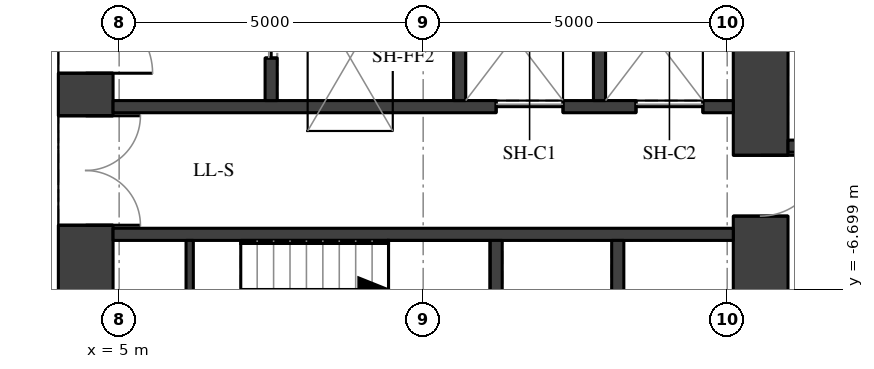
"""IFC4 building model, lengths in metres.
Left out: names, types, materials, properties, quantities, classifications, styles, units other than length and angle.
Written with IfcOpenShell. Run it as: python <this file> out.ifc"""

import sys

from ifc_helpers import new_model, si_unit, direction, frame, frame_2d, origin, place, context, subcontext, project, spatial, rectangle, extrude, element, fill, save


model = new_model("IFC4")
c1 = context("Model", 3, precision=1e-05, world=origin(), true_north=direction((0.0, 1.0)))
c2 = subcontext(c1, "Body", "Model", "MODEL_VIEW")
j1 = project(units=[si_unit("LENGTHUNIT", "METRE"), si_unit("PLANEANGLEUNIT", "RADIAN")], contexts=[c1])
p1 = place(None, origin())
s1 = spatial("IfcSite", under=j1, at=p1, CompositionType="ELEMENT")
p2 = place(p1, origin())
s2 = spatial("IfcBuilding", under=s1, at=p2, CompositionType="ELEMENT")
p3 = place(p2, frame((0.0, 0.0, 25.0)))
s3 = spatial("IfcBuildingStorey", under=s2, at=p3, CompositionType="ELEMENT", Elevation=25.0)
p4 = place(p3, frame((4.45, -11.1, 0.0), z_axis=(0.0, 0.0, 1.0), x_axis=(0.0, 1.0, 0.0)))
e1 = element("IfcWall", 1, at=p4, inside=s3, PredefinedType="SHEAR", context=c2, shape_type="SweptSolid", body=[
    extrude(rectangle(XDim=22.2, YDim=0.9, at=frame_2d((11.1, 0.0))), origin(), (0.0, 0.0, 1.0), 3.02),
])
p5 = place(p4, frame((2.35, 0.0, 0.0)))
e2 = element("IfcOpeningElement", 2, at=p5, cuts=e1, PredefinedType="OPENING", context=c2, shape_type="SweptSolid", body=[
    extrude(rectangle(XDim=1.5, YDim=2.1, at=frame_2d((0.75, 1.05))), frame((0.0, 0.46, 0.0), z_axis=(0.0, -1.0, 0.0), x_axis=(1.0, 0.0, 0.0)), (0.0, 0.0, 1.0), 0.92),
])
p6 = place(p4, frame((5.45, 0.0, 0.0)))
e3 = element("IfcOpeningElement", 3, at=p6, cuts=e1, PredefinedType="OPENING", context=c2, shape_type="SweptSolid", body=[
    extrude(rectangle(XDim=1.8, YDim=2.1, at=frame_2d((0.9, 1.05))), frame((0.0, 0.46, 0.0), z_axis=(0.0, -1.0, 0.0), x_axis=(1.0, 0.0, 0.0)), (0.0, 0.0, 1.0), 0.92),
])
p7 = place(p4, frame((7.95, 0.0, 0.0)))
e4 = element("IfcOpeningElement", 4, at=p7, cuts=e1, PredefinedType="OPENING", context=c2, shape_type="SweptSolid", body=[
    extrude(rectangle(XDim=1.1, YDim=2.1, at=frame_2d((0.55, 1.05))), frame((0.0, 0.46, 0.0), z_axis=(0.0, -1.0, 0.0), x_axis=(1.0, 0.0, 0.0)), (0.0, 0.0, 1.0), 0.92),
])
p8 = place(p4, frame((10.6, 0.0, 0.0)))
e5 = element("IfcOpeningElement", 5, at=p8, cuts=e1, PredefinedType="OPENING", context=c2, shape_type="SweptSolid", body=[
    extrude(rectangle(XDim=1.0, YDim=2.1, at=frame_2d((0.5, 1.05))), frame((0.0, 0.46, 0.0), z_axis=(0.0, -1.0, 0.0), x_axis=(1.0, 0.0, 0.0)), (0.0, 0.0, 1.0), 0.92),
])
p9 = place(p4, frame((13.15, 0.0, 0.0)))
e6 = element("IfcOpeningElement", 6, at=p9, cuts=e1, PredefinedType="OPENING", context=c2, shape_type="SweptSolid", body=[
    extrude(rectangle(XDim=1.1, YDim=2.1, at=frame_2d((0.55, 1.05))), frame((0.0, 0.46, 0.0), z_axis=(0.0, -1.0, 0.0), x_axis=(1.0, 0.0, 0.0)), (0.0, 0.0, 1.0), 0.92),
])
p10 = place(p4, frame((14.95, 0.0, 0.0)))
e7 = element("IfcOpeningElement", 7, at=p10, cuts=e1, PredefinedType="OPENING", context=c2, shape_type="SweptSolid", body=[
    extrude(rectangle(XDim=1.8, YDim=2.1, at=frame_2d((0.9, 1.05))), frame((0.0, 0.46, 0.0), z_axis=(0.0, -1.0, 0.0), x_axis=(1.0, 0.0, 0.0)), (0.0, 0.0, 1.0), 0.92),
])
p11 = place(p4, frame((18.35, 0.0, 0.0)))
e8 = element("IfcOpeningElement", 8, at=p11, cuts=e1, PredefinedType="OPENING", context=c2, shape_type="SweptSolid", body=[
    extrude(rectangle(XDim=1.5, YDim=2.1, at=frame_2d((0.75, 1.05))), frame((0.0, 0.46, 0.0), z_axis=(0.0, -1.0, 0.0), x_axis=(1.0, 0.0, 0.0)), (0.0, 0.0, 1.0), 0.92),
])
p12 = place(p3, frame((15.55, -11.1, 0.0), z_axis=(0.0, 0.0, 1.0), x_axis=(0.0, 1.0, 0.0)))
e9 = element("IfcWall", 9, at=p12, inside=s3, PredefinedType="SHEAR", context=c2, shape_type="SweptSolid", body=[
    extrude(rectangle(XDim=22.2, YDim=0.9, at=frame_2d((11.1, 0.0))), origin(), (0.0, 0.0, 1.0), 3.02),
])
p13 = place(p12, frame((15.6, 0.0, 0.0)))
e10 = element("IfcOpeningElement", 10, at=p13, cuts=e9, PredefinedType="OPENING", context=c2, shape_type="SweptSolid", body=[
    extrude(rectangle(XDim=1.0, YDim=2.1, at=frame_2d((0.5, 1.05))), frame((0.0, 0.46, 0.0), z_axis=(0.0, -1.0, 0.0), x_axis=(1.0, 0.0, 0.0)), (0.0, 0.0, 1.0), 0.92),
])
p14 = place(p12, frame((5.6, 0.0, 0.0)))
e11 = element("IfcOpeningElement", 11, at=p14, cuts=e9, PredefinedType="OPENING", context=c2, shape_type="SweptSolid", body=[
    extrude(rectangle(XDim=1.0, YDim=2.1, at=frame_2d((0.5, 1.05))), frame((0.0, 0.46, 0.0), z_axis=(0.0, -1.0, 0.0), x_axis=(1.0, 0.0, 0.0)), (0.0, 0.0, 1.0), 0.92),
])
p15 = place(p3, frame((4.9, -3.7, 0.0), z_axis=(0.0, 0.0, 1.0), x_axis=(1.0, 0.0, 0.0)))
e12 = element("IfcWall", 12, at=p15, inside=s3, PredefinedType="SHEAR", context=c2, shape_type="SweptSolid", body=[
    extrude(rectangle(XDim=10.2, YDim=0.2, at=frame_2d((5.1, 0.0))), origin(), (0.0, 0.0, 1.0), 3.02),
])
p16 = place(p15, frame((6.3, 0.0, 0.0)))
e13 = element("IfcOpeningElement", 13, at=p16, cuts=e12, PredefinedType="OPENING", context=c2, shape_type="SweptSolid", body=[
    extrude(rectangle(XDim=1.1, YDim=2.1, at=frame_2d((0.55, 1.05))), frame((0.0, 0.11, 0.0), z_axis=(0.0, -1.0, 0.0), x_axis=(1.0, 0.0, 0.0)), (0.0, 0.0, 1.0), 0.22),
])
p17 = place(p15, frame((8.6, 0.0, 0.0)))
e14 = element("IfcOpeningElement", 14, at=p17, cuts=e12, PredefinedType="OPENING", context=c2, shape_type="SweptSolid", body=[
    extrude(rectangle(XDim=1.1, YDim=2.1, at=frame_2d((0.55, 1.05))), frame((0.0, 0.11, 0.0), z_axis=(0.0, -1.0, 0.0), x_axis=(1.0, 0.0, 0.0)), (0.0, 0.0, 1.0), 0.22),
])
p18 = place(p3, frame((4.9, -5.8, 0.0), z_axis=(0.0, 0.0, 1.0), x_axis=(1.0, 0.0, 0.0)))
e15 = element("IfcWall", 15, at=p18, inside=s3, PredefinedType="SHEAR", context=c2, shape_type="SweptSolid", body=[
    extrude(rectangle(XDim=10.2, YDim=0.2, at=frame_2d((5.1, 0.0))), origin(), (0.0, 0.0, 1.0), 3.02),
])
for number, where, z_axis, x_axis in (
    (16, (11.2, -9.1, 0.0), (0.0, 0.0, 1.0), (0.0, 1.0, 0.0)),
    (17, (13.2, -9.1, 0.0), (0.0, 0.0, 1.0), (0.0, 1.0, 0.0)),
):
    element("IfcWall", number, at=place(p3, frame(where, z_axis=z_axis, x_axis=x_axis)), inside=s3, PredefinedType="SHEAR", context=c2, shape_type="SweptSolid", body=[
        extrude(rectangle(XDim=3.2, YDim=0.2, at=frame_2d((1.6, 0.0))), origin(), (0.0, 0.0, 1.0), 3.02),
    ])
p19 = place(p3, frame((7.5, -3.6, 0.0), z_axis=(0.0, 0.0, 1.0), x_axis=(0.0, 1.0, 0.0)))
e18 = element("IfcWall", 18, at=p19, inside=s3, PredefinedType="SHEAR", context=c2, shape_type="SweptSolid", body=[
    extrude(rectangle(XDim=2.5, YDim=0.2, at=frame_2d((1.25, 0.0))), origin(), (0.0, 0.0, 1.0), 3.02),
])
p20 = place(p19, frame((0.7, 0.0, 0.0)))
e19 = element("IfcOpeningElement", 19, at=p20, cuts=e18, PredefinedType="OPENING", context=c2, shape_type="SweptSolid", body=[
    extrude(rectangle(XDim=1.1, YDim=2.1, at=frame_2d((0.55, 1.05))), frame((0.0, 0.11, 0.0), z_axis=(0.0, -1.0, 0.0), x_axis=(1.0, 0.0, 0.0)), (0.0, 0.0, 1.0), 0.22),
])
for number, where, z_axis, x_axis in (
    (20, (10.6, -3.6, 0.0), (0.0, 0.0, 1.0), (0.0, 1.0, 0.0)),
    (21, (12.9, -3.6, 0.0), (0.0, 0.0, 1.0), (0.0, 1.0, 0.0)),
):
    element("IfcWall", number, at=place(p3, frame(where, z_axis=z_axis, x_axis=x_axis)), inside=s3, PredefinedType="SHEAR", context=c2, shape_type="SweptSolid", body=[
        extrude(rectangle(XDim=2.5, YDim=0.2, at=frame_2d((1.25, 0.0))), origin(), (0.0, 0.0, 1.0), 3.02),
    ])
p21 = place(p3, frame((6.16, -9.1, 0.0), z_axis=(0.0, 0.0, 1.0), x_axis=(0.0, 1.0, 0.0)))
e22 = element("IfcWall", 22, at=p21, inside=s3, PredefinedType="SHEAR", context=c2, shape_type="SweptSolid", body=[
    extrude(rectangle(XDim=3.2, YDim=0.12, at=frame_2d((1.6, 0.0))), origin(), (0.0, 0.0, 1.0), 3.02),
])
p22 = place(p21, frame((0.85, 0.0, 0.0)))
e23 = element("IfcOpeningElement", 23, at=p22, cuts=e22, PredefinedType="OPENING", context=c2, shape_type="SweptSolid", body=[
    extrude(rectangle(XDim=1.5, YDim=2.1, at=frame_2d((0.75, 1.05))), frame((0.0, 0.07, 0.0), z_axis=(0.0, -1.0, 0.0), x_axis=(1.0, 0.0, 0.0)), (0.0, 0.0, 1.0), 0.14),
])
p23 = place(p3, frame((16.0, -4.35, 0.0), z_axis=(0.0, 0.0, 1.0), x_axis=(1.0, 0.0, 0.0)))
e24 = element("IfcWall", 24, at=p23, inside=s3, PredefinedType="SHEAR", context=c2, shape_type="SweptSolid", body=[
    extrude(rectangle(XDim=2.3, YDim=0.2, at=frame_2d((1.15, 0.0))), origin(), (0.0, 0.0, 1.0), 3.02),
])
p24 = place(p6, origin())
e25 = element("IfcDoor", 25, at=p24, inside=s3, OperationType="DOUBLE_DOOR_SINGLE_SWING", PredefinedType="DOOR", context=c2, shape_type="SweptSolid", body=[
    extrude(rectangle(XDim=1.8, YDim=2.1, at=frame_2d((0.9, 1.05))), frame((0.0, 0.025, 0.0), z_axis=(0.0, -1.0, 0.0), x_axis=(1.0, 0.0, 0.0)), (0.0, 0.0, 1.0), 0.05),
])
fill(e3, e25)
p25 = place(p7, origin())
e26 = element("IfcDoor", 26, at=p25, inside=s3, OperationType="SINGLE_SWING_RIGHT", PredefinedType="DOOR", context=c2, shape_type="SweptSolid", body=[
    extrude(rectangle(XDim=1.1, YDim=2.1, at=frame_2d((0.55, 1.05))), frame((0.0, 0.025, 0.0), z_axis=(0.0, -1.0, 0.0), x_axis=(1.0, 0.0, 0.0)), (0.0, 0.0, 1.0), 0.05),
])
fill(e4, e26)
p26 = place(p16, origin())
e27 = element("IfcDoor", 27, at=p26, inside=s3, OperationType="DOUBLE_DOOR_SLIDING", PredefinedType="DOOR", context=c2, shape_type="SweptSolid", body=[
    extrude(rectangle(XDim=1.1, YDim=2.1, at=frame_2d((0.55, 1.05))), frame((0.0, 0.025, 0.0), z_axis=(0.0, -1.0, 0.0), x_axis=(1.0, 0.0, 0.0)), (0.0, 0.0, 1.0), 0.05),
])
fill(e13, e27)
p27 = place(p17, origin())
e28 = element("IfcDoor", 28, at=p27, inside=s3, OperationType="DOUBLE_DOOR_SLIDING", PredefinedType="DOOR", context=c2, shape_type="SweptSolid", body=[
    extrude(rectangle(XDim=1.1, YDim=2.1, at=frame_2d((0.55, 1.05))), frame((0.0, 0.025, 0.0), z_axis=(0.0, -1.0, 0.0), x_axis=(1.0, 0.0, 0.0)), (0.0, 0.0, 1.0), 0.05),
])
fill(e14, e28)
p28 = place(p20, origin())
e29 = element("IfcDoor", 29, at=p28, inside=s3, OperationType="DOUBLE_DOOR_SLIDING", PredefinedType="DOOR", context=c2, shape_type="SweptSolid", body=[
    extrude(rectangle(XDim=1.1, YDim=2.1, at=frame_2d((0.55, 1.05))), frame((0.0, 0.025, 0.0), z_axis=(0.0, -1.0, 0.0), x_axis=(1.0, 0.0, 0.0)), (0.0, 0.0, 1.0), 0.05),
])
fill(e19, e29)
p29 = place(p14, origin())
e30 = element("IfcDoor", 30, at=p29, inside=s3, OperationType="SINGLE_SWING_LEFT", PredefinedType="DOOR", context=c2, shape_type="SweptSolid", body=[
    extrude(rectangle(XDim=1.0, YDim=2.1, at=frame_2d((0.5, 1.05))), frame((0.0, 0.025, 0.0), z_axis=(0.0, -1.0, 0.0), x_axis=(1.0, 0.0, 0.0)), (0.0, 0.0, 1.0), 0.05),
])
fill(e11, e30)
save(model, sys.argv[1])
